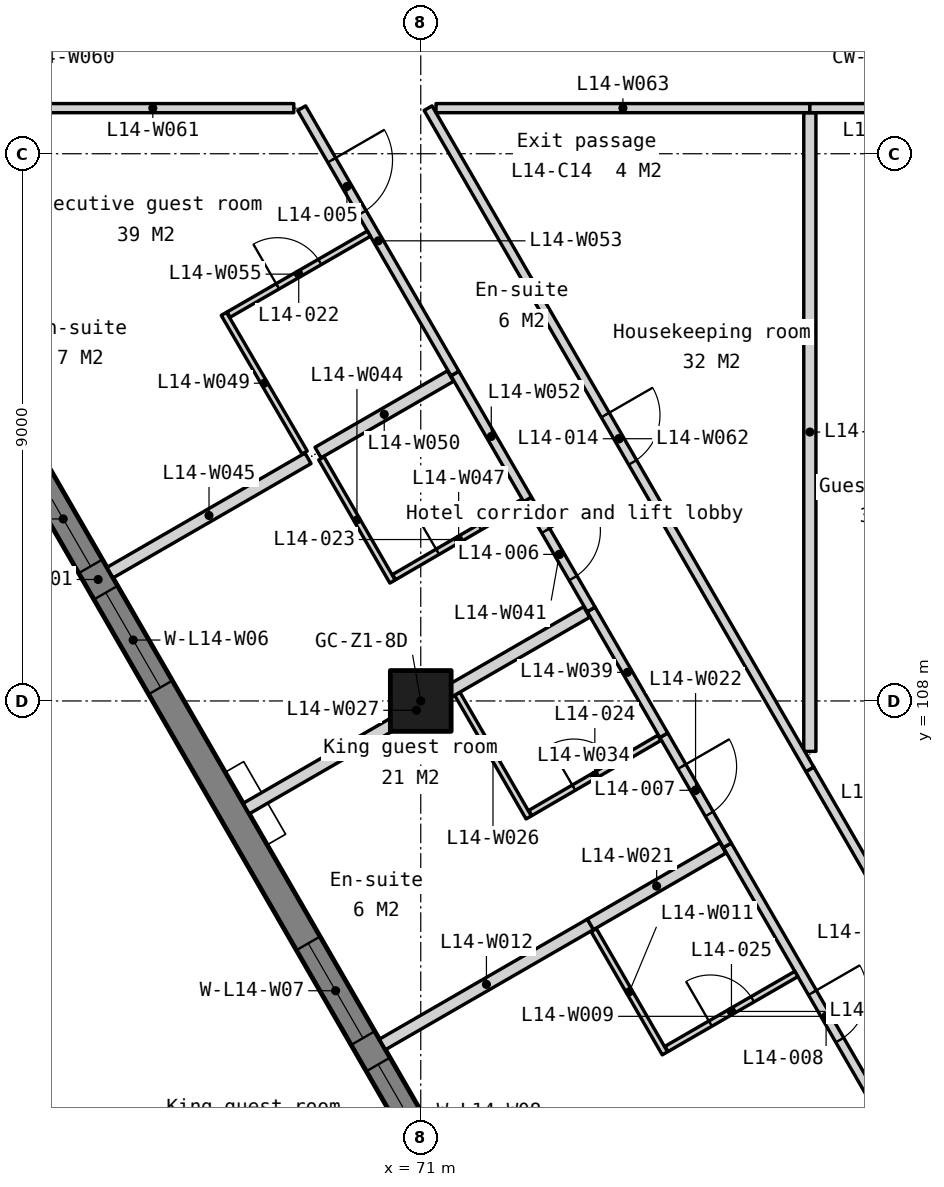
"""IFC4 building model, lengths in metres.
Left out: names, types, materials, properties, quantities, classifications, styles, units other than length and angle.
Written with IfcOpenShell. Run it as: python <this file> out.ifc"""

import sys

from ifc_helpers import new_model, si_unit, direction, frame, frame_2d, origin, origin_2d, place, context, subcontext, project, spatial, polyline, rectangle, outline, extrude, element, fill, save


model = new_model("IFC4")
c1 = context("Model", 3, precision=1e-05, world=origin(), true_north=direction((0.0, 1.0)))
c2 = subcontext(c1, "Body", "Model", "MODEL_VIEW")
j1 = project(units=[si_unit("LENGTHUNIT", "METRE"), si_unit("PLANEANGLEUNIT", "RADIAN")], contexts=[c1])
p1 = place(None, origin())
s1 = spatial("IfcSite", under=j1, at=p1, CompositionType="ELEMENT")
p2 = place(p1, origin())
s2 = spatial("IfcBuilding", under=s1, at=p2, CompositionType="ELEMENT")
p3 = place(p2, frame((0.0, 0.0, 63.0)))
s3 = spatial("IfcBuildingStorey", under=s2, at=p3, CompositionType="ELEMENT", Elevation=63.0)
p4 = place(p3, frame((71.0, 108.0, 0.0), z_axis=(0.0, 0.0, 1.0), x_axis=(1.0, 0.0, 0.0)))
e1 = element("IfcColumn", 1, at=p4, inside=s3, PredefinedType="COLUMN", context=c2, shape_type="SweptSolid", body=[
    extrude(rectangle(XDim=1.0, YDim=1.0, at=origin_2d()), origin(), (0.0, 0.0, 1.0), 3.5),
])
p5 = place(p3, frame((54.495, 129.397, -0.15), z_axis=(0.0, 0.0, 1.0), x_axis=(0.499999201451, -0.866025864826, 0.0)))
e2 = element("IfcWall", 2, at=p5, inside=s3, PredefinedType="SOLIDWALL", context=c2, shape_type="SweptSolid", body=[
    extrude(outline(polyline([(44.8, 0.0), (44.8, 3.5), (0.0, 3.5), (0.0, 0.0), (44.8, 0.0)])), frame((0.0, 0.225, 0.0), z_axis=(0.0, -1.0, 0.0), x_axis=(1.0, 0.0, 0.0)), (0.0, 0.0, 1.0), 0.45),
])
p6 = place(p5, frame((2.43, 0.0, 1.05)))
e3 = element("IfcOpeningElement", 3, at=p6, cuts=e2, PredefinedType="OPENING", context=c2, shape_type="SweptSolid", body=[
    extrude(rectangle(XDim=1.8, YDim=1.5, at=frame_2d((0.9, 0.75))), frame((0.0, 0.235, 0.0), z_axis=(0.0, -1.0, 0.0), x_axis=(1.0, 0.0, 0.0)), (0.0, 0.0, 1.0), 0.47),
])
p7 = place(p5, frame((4.73, 0.0, 1.05)))
e4 = element("IfcOpeningElement", 4, at=p7, cuts=e2, PredefinedType="OPENING", context=c2, shape_type="SweptSolid", body=[
    extrude(rectangle(XDim=1.8, YDim=1.5, at=frame_2d((0.9, 0.75))), frame((0.0, 0.235, 0.0), z_axis=(0.0, -1.0, 0.0), x_axis=(1.0, 0.0, 0.0)), (0.0, 0.0, 1.0), 0.47),
])
p8 = place(p5, frame((11.39, 0.0, 1.05)))
e5 = element("IfcOpeningElement", 5, at=p8, cuts=e2, PredefinedType="OPENING", context=c2, shape_type="SweptSolid", body=[
    extrude(rectangle(XDim=1.8, YDim=1.5, at=frame_2d((0.9, 0.75))), frame((0.0, 0.235, 0.0), z_axis=(0.0, -1.0, 0.0), x_axis=(1.0, 0.0, 0.0)), (0.0, 0.0, 1.0), 0.47),
])
p9 = place(p5, frame((13.69, 0.0, 1.05)))
e6 = element("IfcOpeningElement", 6, at=p9, cuts=e2, PredefinedType="OPENING", context=c2, shape_type="SweptSolid", body=[
    extrude(rectangle(XDim=1.8, YDim=1.5, at=frame_2d((0.9, 0.75))), frame((0.0, 0.235, 0.0), z_axis=(0.0, -1.0, 0.0), x_axis=(1.0, 0.0, 0.0)), (0.0, 0.0, 1.0), 0.47),
])
p10 = place(p5, frame((20.35, 0.0, 1.05)))
e7 = element("IfcOpeningElement", 7, at=p10, cuts=e2, PredefinedType="OPENING", context=c2, shape_type="SweptSolid", body=[
    extrude(rectangle(XDim=1.8, YDim=1.5, at=frame_2d((0.9, 0.75))), frame((0.0, 0.235, 0.0), z_axis=(0.0, -1.0, 0.0), x_axis=(1.0, 0.0, 0.0)), (0.0, 0.0, 1.0), 0.47),
])
p11 = place(p5, frame((22.65, 0.0, 1.05)))
e8 = element("IfcOpeningElement", 8, at=p11, cuts=e2, PredefinedType="OPENING", context=c2, shape_type="SweptSolid", body=[
    extrude(rectangle(XDim=1.8, YDim=1.5, at=frame_2d((0.9, 0.75))), frame((0.0, 0.235, 0.0), z_axis=(0.0, -1.0, 0.0), x_axis=(1.0, 0.0, 0.0)), (0.0, 0.0, 1.0), 0.47),
])
p12 = place(p5, frame((29.31, 0.0, 1.05)))
e9 = element("IfcOpeningElement", 9, at=p12, cuts=e2, PredefinedType="OPENING", context=c2, shape_type="SweptSolid", body=[
    extrude(rectangle(XDim=1.8, YDim=1.5, at=frame_2d((0.9, 0.75))), frame((0.0, 0.235, 0.0), z_axis=(0.0, -1.0, 0.0), x_axis=(1.0, 0.0, 0.0)), (0.0, 0.0, 1.0), 0.47),
])
p13 = place(p5, frame((31.61, 0.0, 1.05)))
e10 = element("IfcOpeningElement", 10, at=p13, cuts=e2, PredefinedType="OPENING", context=c2, shape_type="SweptSolid", body=[
    extrude(rectangle(XDim=1.8, YDim=1.5, at=frame_2d((0.9, 0.75))), frame((0.0, 0.235, 0.0), z_axis=(0.0, -1.0, 0.0), x_axis=(1.0, 0.0, 0.0)), (0.0, 0.0, 1.0), 0.47),
])
p14 = place(p5, frame((38.27, 0.0, 1.05)))
e11 = element("IfcOpeningElement", 11, at=p14, cuts=e2, PredefinedType="OPENING", context=c2, shape_type="SweptSolid", body=[
    extrude(rectangle(XDim=1.8, YDim=1.5, at=frame_2d((0.9, 0.75))), frame((0.0, 0.235, 0.0), z_axis=(0.0, -1.0, 0.0), x_axis=(1.0, 0.0, 0.0)), (0.0, 0.0, 1.0), 0.47),
])
p15 = place(p5, frame((40.57, 0.0, 1.05)))
e12 = element("IfcOpeningElement", 12, at=p15, cuts=e2, PredefinedType="OPENING", context=c2, shape_type="SweptSolid", body=[
    extrude(rectangle(XDim=1.8, YDim=1.5, at=frame_2d((0.9, 0.75))), frame((0.0, 0.235, 0.0), z_axis=(0.0, -1.0, 0.0), x_axis=(1.0, 0.0, 0.0)), (0.0, 0.0, 1.0), 0.47),
])
p16 = place(p3, frame((76.042, 105.626, 0.0), z_axis=(0.0, 0.0, 1.0), x_axis=(0.499991405182, -0.866030365948, 0.0)))
e13 = element("IfcWall", 13, at=p16, inside=s3, PredefinedType="PARTITIONING", context=c2, shape_type="SweptSolid", body=[
    extrude(rectangle(XDim=6.496, YDim=0.15, at=frame_2d((3.248, 0.0))), origin(), (0.0, 0.0, 1.0), 3.35),
])
p17 = place(p16, frame((2.798, 0.0, 0.0)))
e14 = element("IfcOpeningElement", 14, at=p17, cuts=e13, PredefinedType="OPENING", context=c2, shape_type="SweptSolid", body=[
    extrude(rectangle(XDim=0.9, YDim=2.1, at=frame_2d((0.45, 1.05))), frame((0.0, 0.085, 0.0), z_axis=(0.0, -1.0, 0.0), x_axis=(1.0, 0.0, 0.0)), (0.0, 0.0, 1.0), 0.17),
])
p18 = place(p3, frame((73.845, 104.23, 0.0), z_axis=(0.0, 0.0, 1.0), x_axis=(0.500032503492, -0.866006637072, 0.0)))
e15 = element("IfcWall", 15, at=p18, inside=s3, PredefinedType="PARTITIONING", context=c2, shape_type="SweptSolid", body=[
    extrude(rectangle(XDim=2.34, YDim=0.1, at=frame_2d((1.17, 0.0))), origin(), (0.0, 0.0, 1.0), 3.35),
])
p19 = place(p3, frame((70.37, 102.351, 0.0), z_axis=(0.0, 0.0, 1.0), x_axis=(0.866020906874, 0.500007788796, 0.0)))
e16 = element("IfcWall", 16, at=p19, inside=s3, PredefinedType="PARTITIONING", context=c2, shape_type="SweptSolid", body=[
    extrude(rectangle(XDim=3.95, YDim=0.2, at=frame_2d((1.975, 0.0))), origin(), (0.0, 0.0, 1.0), 3.35),
])
p20 = place(p3, frame((75.042, 102.277, 0.0), z_axis=(0.0, 0.0, 1.0), x_axis=(0.865997559407, 0.500048224776, 0.0)))
e17 = element("IfcWall", 17, at=p20, inside=s3, PredefinedType="PARTITIONING", context=c2, shape_type="SweptSolid", body=[
    extrude(rectangle(XDim=2.465, YDim=0.1, at=frame_2d((1.232, 0.0))), origin(), (0.0, 0.0, 1.0), 3.35),
])
p21 = place(p20, frame((0.833, 0.0, 0.0)))
e18 = element("IfcOpeningElement", 18, at=p21, cuts=e17, PredefinedType="OPENING", context=c2, shape_type="SweptSolid", body=[
    extrude(rectangle(XDim=0.8, YDim=2.1, at=frame_2d((0.4, 1.05))), frame((0.0, 0.06, 0.0), z_axis=(0.0, -1.0, 0.0), x_axis=(1.0, 0.0, 0.0)), (0.0, 0.0, 1.0), 0.12),
])
p22 = place(p3, frame((73.791, 104.326, 0.0), z_axis=(0.0, 0.0, 1.0), x_axis=(0.866006140796, 0.500033362991, 0.0)))
e19 = element("IfcWall", 19, at=p22, inside=s3, PredefinedType="PARTITIONING", context=c2, shape_type="SweptSolid", body=[
    extrude(rectangle(XDim=2.515, YDim=0.2, at=frame_2d((1.257, 0.0))), origin(), (0.0, 0.0, 1.0), 3.35),
])
p23 = place(p3, frame((74.997, 107.436, 0.0), z_axis=(0.0, 0.0, 1.0), x_axis=(0.500096586542, -0.865969632337, 0.0)))
e20 = element("IfcWall", 20, at=p23, inside=s3, PredefinedType="PARTITIONING", context=c2, shape_type="SweptSolid", body=[
    extrude(rectangle(XDim=2.09, YDim=0.15, at=frame_2d((1.045, 0.0))), origin(), (0.0, 0.0, 1.0), 3.35),
])
p24 = place(p23, frame((0.595, 0.0, 0.0)))
e21 = element("IfcOpeningElement", 21, at=p24, cuts=e20, PredefinedType="OPENING", context=c2, shape_type="SweptSolid", body=[
    extrude(rectangle(XDim=0.9, YDim=2.1, at=frame_2d((0.45, 1.05))), frame((0.0, 0.085, 0.0), z_axis=(0.0, -1.0, 0.0), x_axis=(1.0, 0.0, 0.0)), (0.0, 0.0, 1.0), 0.17),
])
p25 = place(p3, frame((71.601, 108.119, 0.0), z_axis=(0.0, 0.0, 1.0), x_axis=(0.499938297808, -0.866061024631, 0.0)))
e22 = element("IfcWall", 22, at=p25, inside=s3, PredefinedType="PARTITIONING", context=c2, shape_type="SweptSolid", body=[
    extrude(rectangle(XDim=2.35, YDim=0.1, at=frame_2d((1.175, 0.0))), origin(), (0.0, 0.0, 1.0), 3.35),
])
p26 = place(p3, frame((68.13, 106.23, 0.0), z_axis=(0.0, 0.0, 1.0), x_axis=(0.86603151488, 0.499989415123, 0.0)))
e23 = element("IfcWall", 23, at=p26, inside=s3, PredefinedType="PARTITIONING", context=c2, shape_type="SweptSolid", body=[
    extrude(rectangle(XDim=6.465, YDim=0.2, at=frame_2d((3.232, 0.0))), origin(), (0.0, 0.0, 1.0), 3.35),
])
p27 = place(p3, frame((77.399, 106.875, 0.0), z_axis=(0.0, 0.0, 1.0), x_axis=(0.500017996867, -0.866015013039, 0.0)))
e24 = element("IfcWall", 24, at=p27, inside=s3, PredefinedType="PARTITIONING", context=c2, shape_type="SweptSolid", body=[
    extrude(rectangle(XDim=5.077, YDim=0.15, at=frame_2d((2.539, 0.0))), origin(), (0.0, 0.0, 1.0), 3.35),
])
p28 = place(p27, frame((2.088, 0.0, 0.0)))
e25 = element("IfcOpeningElement", 25, at=p28, cuts=e24, PredefinedType="OPENING", context=c2, shape_type="SweptSolid", body=[
    extrude(rectangle(XDim=0.9, YDim=2.1, at=frame_2d((0.45, 1.05))), frame((0.0, 0.085, 0.0), z_axis=(0.0, -1.0, 0.0), x_axis=(1.0, 0.0, 0.0)), (0.0, 0.0, 1.0), 0.17),
])
p29 = place(p3, frame((77.399, 107.171, 0.0), z_axis=(0.0, 0.0, 1.0), x_axis=(0.0, 1.0, 0.0)))
e26 = element("IfcWall", 26, at=p29, inside=s3, PredefinedType="PARTITIONING", context=c2, shape_type="SweptSolid", body=[
    extrude(rectangle(XDim=10.504, YDim=0.2, at=frame_2d((5.252, 0.0))), origin(), (0.0, 0.0, 1.0), 3.35),
])
p30 = place(p3, frame((72.802, 106.157, 0.0), z_axis=(0.0, 0.0, 1.0), x_axis=(0.864132137734, 0.503264988386, 0.0)))
e27 = element("IfcWall", 27, at=p30, inside=s3, PredefinedType="PARTITIONING", context=c2, shape_type="SweptSolid", body=[
    extrude(rectangle(XDim=2.455, YDim=0.1, at=frame_2d((1.228, 0.0))), origin(), (0.0, 0.0, 1.0), 3.35),
])
p31 = place(p30, frame((0.827, 0.0, 0.0)))
e28 = element("IfcOpeningElement", 28, at=p31, cuts=e27, PredefinedType="OPENING", context=c2, shape_type="SweptSolid", body=[
    extrude(rectangle(XDim=0.8, YDim=2.1, at=frame_2d((0.4, 1.05))), frame((0.0, 0.06, 0.0), z_axis=(0.0, -1.0, 0.0), x_axis=(1.0, 0.0, 0.0)), (0.0, 0.0, 1.0), 0.12),
])
p32 = place(p3, frame((73.802, 109.505, 0.0), z_axis=(0.0, 0.0, 1.0), x_axis=(0.499940577336, -0.866059708757, 0.0)))
e29 = element("IfcWall", 29, at=p32, inside=s3, PredefinedType="PARTITIONING", context=c2, shape_type="SweptSolid", body=[
    extrude(rectangle(XDim=2.39, YDim=0.15, at=frame_2d((1.195, 0.0))), origin(), (0.0, 0.0, 1.0), 3.35),
])
p33 = place(p3, frame((72.757, 111.315, 0.0), z_axis=(0.0, 0.0, 1.0), x_axis=(0.500046000743, -0.865998843614, 0.0)))
e30 = element("IfcWall", 30, at=p33, inside=s3, PredefinedType="PARTITIONING", context=c2, shape_type="SweptSolid", body=[
    extrude(rectangle(XDim=2.09, YDim=0.15, at=frame_2d((1.045, 0.0))), origin(), (0.0, 0.0, 1.0), 3.35),
])
p34 = place(p33, frame((0.595, 0.0, 0.0)))
e31 = element("IfcOpeningElement", 31, at=p34, cuts=e30, PredefinedType="OPENING", context=c2, shape_type="SweptSolid", body=[
    extrude(rectangle(XDim=0.9, YDim=2.1, at=frame_2d((0.45, 1.05))), frame((0.0, 0.085, 0.0), z_axis=(0.0, -1.0, 0.0), x_axis=(1.0, 0.0, 0.0)), (0.0, 0.0, 1.0), 0.17),
])
p35 = place(p3, frame((69.365, 111.99, 0.0), z_axis=(0.0, 0.0, 1.0), x_axis=(0.499999433879, -0.866025730634, 0.0)))
e32 = element("IfcWall", 32, at=p35, inside=s3, PredefinedType="PARTITIONING", context=c2, shape_type="SweptSolid", body=[
    extrude(rectangle(XDim=2.34, YDim=0.1, at=frame_2d((1.17, 0.0))), origin(), (0.0, 0.0, 1.0), 3.35),
])
p36 = place(p3, frame((65.89, 110.11, 0.0), z_axis=(0.0, 0.0, 1.0), x_axis=(0.866045024864, 0.499966013754, 0.0)))
e33 = element("IfcWall", 33, at=p36, inside=s3, PredefinedType="PARTITIONING", context=c2, shape_type="SweptSolid", body=[
    extrude(rectangle(XDim=3.76, YDim=0.2, at=frame_2d((1.88, 0.0))), origin(), (0.0, 0.0, 1.0), 3.35),
])
p37 = place(p3, frame((70.562, 110.037, 0.0), z_axis=(0.0, 0.0, 1.0), x_axis=(0.864132137734, 0.503264988386, 0.0)))
e34 = element("IfcWall", 34, at=p37, inside=s3, PredefinedType="PARTITIONING", context=c2, shape_type="SweptSolid", body=[
    extrude(rectangle(XDim=2.455, YDim=0.1, at=frame_2d((1.228, 0.0))), origin(), (0.0, 0.0, 1.0), 3.35),
])
p38 = place(p37, frame((0.827, 0.0, 0.0)))
e35 = element("IfcOpeningElement", 35, at=p38, cuts=e34, PredefinedType="OPENING", context=c2, shape_type="SweptSolid", body=[
    extrude(rectangle(XDim=0.8, YDim=2.1, at=frame_2d((0.4, 1.05))), frame((0.0, 0.06, 0.0), z_axis=(0.0, -1.0, 0.0), x_axis=(1.0, 0.0, 0.0)), (0.0, 0.0, 1.0), 0.12),
])
p39 = place(p3, frame((67.762, 114.367, 0.0), z_axis=(0.0, 0.0, 1.0), x_axis=(0.503163628445, -0.86419116115, 0.0)))
e36 = element("IfcWall", 36, at=p39, inside=s3, PredefinedType="PARTITIONING", context=c2, shape_type="SweptSolid", body=[
    extrude(rectangle(XDim=2.64, YDim=0.1, at=frame_2d((1.32, 0.0))), origin(), (0.0, 0.0, 1.0), 3.35),
])
p40 = place(p3, frame((69.311, 112.085, 0.0), z_axis=(0.0, 0.0, 1.0), x_axis=(0.866006140796, 0.500033362991, 0.0)))
e37 = element("IfcWall", 37, at=p40, inside=s3, PredefinedType="PARTITIONING", context=c2, shape_type="SweptSolid", body=[
    extrude(rectangle(XDim=2.515, YDim=0.2, at=frame_2d((1.257, 0.0))), origin(), (0.0, 0.0, 1.0), 3.35),
])
p41 = place(p3, frame((71.562, 113.385, 0.0), z_axis=(0.0, 0.0, 1.0), x_axis=(0.499940577336, -0.866059708757, 0.0)))
e38 = element("IfcWall", 38, at=p41, inside=s3, PredefinedType="PARTITIONING", context=c2, shape_type="SweptSolid", body=[
    extrude(rectangle(XDim=2.39, YDim=0.15, at=frame_2d((1.195, 0.0))), origin(), (0.0, 0.0, 1.0), 3.35),
])
p42 = place(p3, frame((69.042, 117.75, 0.0), z_axis=(0.0, 0.0, 1.0), x_axis=(0.500004791531, -0.866022637375, 0.0)))
e39 = element("IfcWall", 39, at=p42, inside=s3, PredefinedType="PARTITIONING", context=c2, shape_type="SweptSolid", body=[
    extrude(rectangle(XDim=5.04, YDim=0.15, at=frame_2d((2.52, 0.0))), origin(), (0.0, 0.0, 1.0), 3.35),
])
p43 = place(p42, frame((0.988, 0.0, 0.0)))
e40 = element("IfcOpeningElement", 40, at=p43, cuts=e39, PredefinedType="OPENING", context=c2, shape_type="SweptSolid", body=[
    extrude(rectangle(XDim=1.0, YDim=2.1, at=frame_2d((0.5, 1.05))), frame((0.0, 0.085, 0.0), z_axis=(0.0, -1.0, 0.0), x_axis=(1.0, 0.0, 0.0)), (0.0, 0.0, 1.0), 0.17),
])
p44 = place(p3, frame((67.839, 114.354, 0.0), z_axis=(0.0, 0.0, 1.0), x_axis=(0.86601318911, 0.500021155841, 0.0)))
e41 = element("IfcWall", 41, at=p44, inside=s3, PredefinedType="PARTITIONING", context=c2, shape_type="SweptSolid", body=[
    extrude(rectangle(XDim=2.665, YDim=0.1, at=frame_2d((1.333, 0.0))), origin(), (0.0, 0.0, 1.0), 3.35),
])
p45 = place(p44, frame((0.933, 0.0, 0.0)))
e42 = element("IfcOpeningElement", 42, at=p45, cuts=e41, PredefinedType="OPENING", context=c2, shape_type="SweptSolid", body=[
    extrude(rectangle(XDim=0.8, YDim=2.1, at=frame_2d((0.4, 1.05))), frame((0.0, 0.06, 0.0), z_axis=(0.0, -1.0, 0.0), x_axis=(1.0, 0.0, 0.0)), (0.0, 0.0, 1.0), 0.12),
])
p46 = place(p3, frame((64.275, 117.75, 0.0), z_axis=(0.0, 0.0, 1.0), x_axis=(1.0, 0.0, 0.0)))
e43 = element("IfcWall", 43, at=p46, inside=s3, PredefinedType="PARTITIONING", context=c2, shape_type="SweptSolid", body=[
    extrude(rectangle(XDim=4.637, YDim=0.15, at=frame_2d((2.319, 0.0))), origin(), (0.0, 0.0, 1.0), 3.35),
])
p47 = place(p3, frame((71.121, 117.75, 0.0), z_axis=(0.0, 0.0, 1.0), x_axis=(0.499995104884, -0.866028229963, 0.0)))
e44 = element("IfcWall", 44, at=p47, inside=s3, PredefinedType="PARTITIONING", context=c2, shape_type="SweptSolid", body=[
    extrude(rectangle(XDim=12.557, YDim=0.15, at=frame_2d((6.278, 0.0))), origin(), (0.0, 0.0, 1.0), 3.35),
])
p48 = place(p47, frame((5.828, 0.0, 0.0)))
e45 = element("IfcOpeningElement", 45, at=p48, cuts=e44, PredefinedType="OPENING", context=c2, shape_type="SweptSolid", body=[
    extrude(rectangle(XDim=0.9, YDim=2.1, at=frame_2d((0.45, 1.05))), frame((0.0, 0.085, 0.0), z_axis=(0.0, -1.0, 0.0), x_axis=(1.0, 0.0, 0.0)), (0.0, 0.0, 1.0), 0.17),
])
p49 = place(p3, frame((71.25, 117.75, 0.0), z_axis=(0.0, 0.0, 1.0), x_axis=(1.0, 0.0, 0.0)))
e46 = element("IfcWall", 46, at=p49, inside=s3, PredefinedType="PARTITIONING", context=c2, shape_type="SweptSolid", body=[
    extrude(rectangle(XDim=6.148, YDim=0.15, at=frame_2d((3.074, 0.0))), origin(), (0.0, 0.0, 1.0), 3.35),
])
p50 = place(p3, frame((77.399, 117.75, 0.0), z_axis=(0.0, 0.0, 1.0), x_axis=(1.0, 0.0, 0.0)))
e47 = element("IfcWall", 47, at=p50, inside=s3, PredefinedType="PARTITIONING", context=c2, shape_type="SweptSolid", body=[
    extrude(rectangle(XDim=2.601, YDim=0.15, at=frame_2d((1.301, 0.0))), origin(), (0.0, 0.0, 1.0), 3.35),
])
p51 = place(p10, origin())
e48 = element("IfcWindow", 48, at=p51, inside=s3, PartitioningType="SINGLE_PANEL", PredefinedType="WINDOW", context=c2, shape_type="SweptSolid", body=[
    extrude(rectangle(XDim=1.8, YDim=1.5, at=frame_2d((0.9, 0.75))), frame((0.0, 0.03, 0.0), z_axis=(0.0, -1.0, 0.0), x_axis=(1.0, 0.0, 0.0)), (0.0, 0.0, 1.0), 0.06),
])
fill(e7, e48)
p52 = place(p11, origin())
e49 = element("IfcWindow", 49, at=p52, inside=s3, PartitioningType="SINGLE_PANEL", PredefinedType="WINDOW", context=c2, shape_type="SweptSolid", body=[
    extrude(rectangle(XDim=1.8, YDim=1.5, at=frame_2d((0.9, 0.75))), frame((0.0, 0.03, 0.0), z_axis=(0.0, -1.0, 0.0), x_axis=(1.0, 0.0, 0.0)), (0.0, 0.0, 1.0), 0.06),
])
fill(e8, e49)
p53 = place(p12, origin())
e50 = element("IfcWindow", 50, at=p53, inside=s3, PartitioningType="SINGLE_PANEL", PredefinedType="WINDOW", context=c2, shape_type="SweptSolid", body=[
    extrude(rectangle(XDim=1.8, YDim=1.5, at=frame_2d((0.9, 0.75))), frame((0.0, 0.03, 0.0), z_axis=(0.0, -1.0, 0.0), x_axis=(1.0, 0.0, 0.0)), (0.0, 0.0, 1.0), 0.06),
])
fill(e9, e50)
p54 = place(p13, origin())
e51 = element("IfcWindow", 51, at=p54, inside=s3, PartitioningType="SINGLE_PANEL", PredefinedType="WINDOW", context=c2, shape_type="SweptSolid", body=[
    extrude(rectangle(XDim=1.8, YDim=1.5, at=frame_2d((0.9, 0.75))), frame((0.0, 0.03, 0.0), z_axis=(0.0, -1.0, 0.0), x_axis=(1.0, 0.0, 0.0)), (0.0, 0.0, 1.0), 0.06),
])
fill(e10, e51)
p55 = place(p43, origin())
e52 = element("IfcDoor", 52, at=p55, inside=s3, OperationType="SINGLE_SWING_LEFT", PredefinedType="DOOR", context=c2, shape_type="SweptSolid", body=[
    extrude(rectangle(XDim=1.0, YDim=2.1, at=frame_2d((0.5, 1.05))), frame((0.0, 0.025, 0.0), z_axis=(0.0, -1.0, 0.0), x_axis=(1.0, 0.0, 0.0)), (0.0, 0.0, 1.0), 0.05),
])
fill(e40, e52)
p56 = place(p34, origin())
e53 = element("IfcDoor", 53, at=p56, inside=s3, OperationType="SINGLE_SWING_LEFT", PredefinedType="DOOR", context=c2, shape_type="SweptSolid", body=[
    extrude(rectangle(XDim=0.9, YDim=2.1, at=frame_2d((0.45, 1.05))), frame((0.0, 0.025, 0.0), z_axis=(0.0, -1.0, 0.0), x_axis=(1.0, 0.0, 0.0)), (0.0, 0.0, 1.0), 0.05),
])
fill(e31, e53)
p57 = place(p24, origin())
e54 = element("IfcDoor", 54, at=p57, inside=s3, OperationType="SINGLE_SWING_LEFT", PredefinedType="DOOR", context=c2, shape_type="SweptSolid", body=[
    extrude(rectangle(XDim=0.9, YDim=2.1, at=frame_2d((0.45, 1.05))), frame((0.0, 0.025, 0.0), z_axis=(0.0, -1.0, 0.0), x_axis=(1.0, 0.0, 0.0)), (0.0, 0.0, 1.0), 0.05),
])
fill(e21, e54)
p58 = place(p17, origin())
e55 = element("IfcDoor", 55, at=p58, inside=s3, OperationType="SINGLE_SWING_LEFT", PredefinedType="DOOR", context=c2, shape_type="SweptSolid", body=[
    extrude(rectangle(XDim=0.9, YDim=2.1, at=frame_2d((0.45, 1.05))), frame((0.0, 0.025, 0.0), z_axis=(0.0, -1.0, 0.0), x_axis=(1.0, 0.0, 0.0)), (0.0, 0.0, 1.0), 0.05),
])
fill(e14, e55)
p59 = place(p48, origin())
e56 = element("IfcDoor", 56, at=p59, inside=s3, OperationType="SINGLE_SWING_LEFT", PredefinedType="DOOR", context=c2, shape_type="SweptSolid", body=[
    extrude(rectangle(XDim=0.9, YDim=2.1, at=frame_2d((0.45, 1.05))), frame((0.0, 0.025, 0.0), z_axis=(0.0, -1.0, 0.0), x_axis=(1.0, 0.0, 0.0)), (0.0, 0.0, 1.0), 0.05),
])
fill(e45, e56)
p60 = place(p45, origin())
e57 = element("IfcDoor", 57, at=p60, inside=s3, OperationType="SINGLE_SWING_LEFT", PredefinedType="DOOR", context=c2, shape_type="SweptSolid", body=[
    extrude(rectangle(XDim=0.8, YDim=2.1, at=frame_2d((0.4, 1.05))), frame((0.0, 0.025, 0.0), z_axis=(0.0, -1.0, 0.0), x_axis=(1.0, 0.0, 0.0)), (0.0, 0.0, 1.0), 0.05),
])
fill(e42, e57)
p61 = place(p38, origin())
e58 = element("IfcDoor", 58, at=p61, inside=s3, OperationType="SINGLE_SWING_LEFT", PredefinedType="DOOR", context=c2, shape_type="SweptSolid", body=[
    extrude(rectangle(XDim=0.8, YDim=2.1, at=frame_2d((0.4, 1.05))), frame((0.0, 0.025, 0.0), z_axis=(0.0, -1.0, 0.0), x_axis=(1.0, 0.0, 0.0)), (0.0, 0.0, 1.0), 0.05),
])
fill(e35, e58)
p62 = place(p31, origin())
e59 = element("IfcDoor", 59, at=p62, inside=s3, OperationType="SINGLE_SWING_LEFT", PredefinedType="DOOR", context=c2, shape_type="SweptSolid", body=[
    extrude(rectangle(XDim=0.8, YDim=2.1, at=frame_2d((0.4, 1.05))), frame((0.0, 0.025, 0.0), z_axis=(0.0, -1.0, 0.0), x_axis=(1.0, 0.0, 0.0)), (0.0, 0.0, 1.0), 0.05),
])
fill(e28, e59)
p63 = place(p21, origin())
e60 = element("IfcDoor", 60, at=p63, inside=s3, OperationType="SINGLE_SWING_LEFT", PredefinedType="DOOR", context=c2, shape_type="SweptSolid", body=[
    extrude(rectangle(XDim=0.8, YDim=2.1, at=frame_2d((0.4, 1.05))), frame((0.0, 0.025, 0.0), z_axis=(0.0, -1.0, 0.0), x_axis=(1.0, 0.0, 0.0)), (0.0, 0.0, 1.0), 0.05),
])
fill(e18, e60)
save(model, sys.argv[1])
